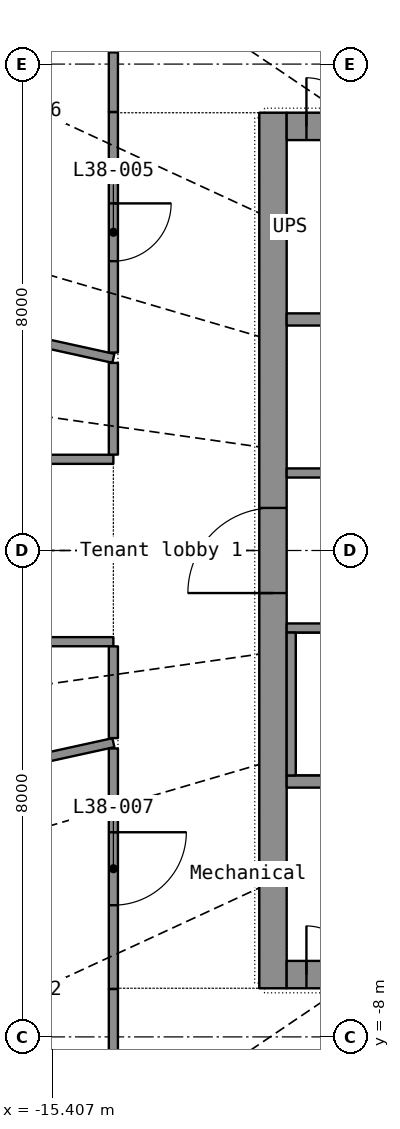
"""IFC4 building model, lengths in metres.
Left out: names, types, materials, properties, quantities, classifications, styles, units other than length and angle.
Written with IfcOpenShell. Run it as: python <this file> out.ifc"""

import sys

from ifc_helpers import new_model, si_unit, direction, frame, frame_2d, origin, place, context, subcontext, project, spatial, rectangle, extrude, element, fill, save


model = new_model("IFC4")
c1 = context("Model", 3, precision=1e-05, world=origin(), true_north=direction((0.0, 1.0)))
c2 = subcontext(c1, "Body", "Model", "MODEL_VIEW")
j1 = project(units=[si_unit("LENGTHUNIT", "METRE"), si_unit("PLANEANGLEUNIT", "RADIAN")], contexts=[c1])
p1 = place(None, origin())
s1 = spatial("IfcSite", under=j1, at=p1, CompositionType="ELEMENT")
p2 = place(p1, origin())
s2 = spatial("IfcBuilding", under=s1, at=p2, CompositionType="ELEMENT")
p3 = place(p2, frame((0.0, 0.0, 160.8)))
s3 = spatial("IfcBuildingStorey", under=s2, at=p3, CompositionType="ELEMENT", Elevation=160.8)
p4 = place(p3, frame((-11.775, -7.2, 0.0), z_axis=(0.0, 0.0, 1.0), x_axis=(0.0, 1.0, 0.0)))
e1 = element("IfcWall", 1, at=p4, inside=s3, PredefinedType="SHEAR", context=c2, shape_type="SweptSolid", body=[
    extrude(rectangle(XDim=14.4, YDim=0.45, at=frame_2d((7.2, 0.0))), origin(), (0.0, 0.0, 1.0), 3.3),
])
p5 = place(p4, frame((6.5, 0.0, 0.0)))
e2 = element("IfcOpeningElement", 2, at=p5, cuts=e1, PredefinedType="OPENING", context=c2, shape_type="SweptSolid", body=[
    extrude(rectangle(XDim=1.4, YDim=2.2, at=frame_2d((0.7, 1.1))), frame((0.0, 0.235, 0.0), z_axis=(0.0, -1.0, 0.0), x_axis=(1.0, 0.0, 0.0)), (0.0, 0.0, 1.0), 0.47),
])
p6 = place(p3, frame((-11.55, -6.975, 0.0), z_axis=(0.0, 0.0, 1.0), x_axis=(1.0, 0.0, 0.0)))
e3 = element("IfcWall", 3, at=p6, inside=s3, PredefinedType="SHEAR", context=c2, shape_type="SweptSolid", body=[
    extrude(rectangle(XDim=23.1, YDim=0.45, at=frame_2d((11.55, 0.0))), origin(), (0.0, 0.0, 1.0), 3.3),
])
p7 = place(p6, frame((20.0, 0.0, 0.0)))
e4 = element("IfcOpeningElement", 4, at=p7, cuts=e3, PredefinedType="OPENING", context=c2, shape_type="SweptSolid", body=[
    extrude(rectangle(XDim=1.1, YDim=2.2, at=frame_2d((0.55, 1.1))), frame((0.0, 0.235, 0.0), z_axis=(0.0, -1.0, 0.0), x_axis=(1.0, 0.0, 0.0)), (0.0, 0.0, 1.0), 0.47),
])
p8 = place(p6, frame((3.1, 0.0, 0.0)))
e5 = element("IfcOpeningElement", 5, at=p8, cuts=e3, PredefinedType="OPENING", context=c2, shape_type="SweptSolid", body=[
    extrude(rectangle(XDim=0.9, YDim=2.1, at=frame_2d((0.45, 1.05))), frame((0.0, 0.235, 0.0), z_axis=(0.0, -1.0, 0.0), x_axis=(1.0, 0.0, 0.0)), (0.0, 0.0, 1.0), 0.47),
])
p9 = place(p6, frame((9.1, 0.0, 0.0)))
e6 = element("IfcOpeningElement", 6, at=p9, cuts=e3, PredefinedType="OPENING", context=c2, shape_type="SweptSolid", body=[
    extrude(rectangle(XDim=0.9, YDim=2.1, at=frame_2d((0.45, 1.05))), frame((0.0, 0.235, 0.0), z_axis=(0.0, -1.0, 0.0), x_axis=(1.0, 0.0, 0.0)), (0.0, 0.0, 1.0), 0.47),
])
p10 = place(p6, frame((16.1, 0.0, 0.0)))
e7 = element("IfcOpeningElement", 7, at=p10, cuts=e3, PredefinedType="OPENING", context=c2, shape_type="SweptSolid", body=[
    extrude(rectangle(XDim=0.9, YDim=2.1, at=frame_2d((0.45, 1.05))), frame((0.0, 0.235, 0.0), z_axis=(0.0, -1.0, 0.0), x_axis=(1.0, 0.0, 0.0)), (0.0, 0.0, 1.0), 0.47),
])
p11 = place(p6, frame((0.325, 0.0, 0.0)))
e8 = element("IfcOpeningElement", 8, at=p11, cuts=e3, PredefinedType="OPENING", context=c2, shape_type="SweptSolid", body=[
    extrude(rectangle(XDim=0.8, YDim=2.05, at=frame_2d((0.4, 1.025))), frame((0.0, 0.235, 0.0), z_axis=(0.0, -1.0, 0.0), x_axis=(1.0, 0.0, 0.0)), (0.0, 0.0, 1.0), 0.47),
])
p12 = place(p6, frame((21.975, 0.0, 0.0)))
e9 = element("IfcOpeningElement", 9, at=p12, cuts=e3, PredefinedType="OPENING", context=c2, shape_type="SweptSolid", body=[
    extrude(rectangle(XDim=0.8, YDim=2.05, at=frame_2d((0.4, 1.025))), frame((0.0, 0.235, 0.0), z_axis=(0.0, -1.0, 0.0), x_axis=(1.0, 0.0, 0.0)), (0.0, 0.0, 1.0), 0.47),
])
p13 = place(p3, frame((-11.55, 6.975, 0.0), z_axis=(0.0, 0.0, 1.0), x_axis=(1.0, 0.0, 0.0)))
e10 = element("IfcWall", 10, at=p13, inside=s3, PredefinedType="SHEAR", context=c2, shape_type="SweptSolid", body=[
    extrude(rectangle(XDim=23.1, YDim=0.45, at=frame_2d((11.55, 0.0))), origin(), (0.0, 0.0, 1.0), 3.3),
])
p14 = place(p13, frame((2.0, 0.0, 0.0)))
e11 = element("IfcOpeningElement", 11, at=p14, cuts=e10, PredefinedType="OPENING", context=c2, shape_type="SweptSolid", body=[
    extrude(rectangle(XDim=1.1, YDim=2.2, at=frame_2d((0.55, 1.1))), frame((0.0, 0.235, 0.0), z_axis=(0.0, -1.0, 0.0), x_axis=(1.0, 0.0, 0.0)), (0.0, 0.0, 1.0), 0.47),
])
p15 = place(p13, frame((6.0, 0.0, 0.0)))
e12 = element("IfcOpeningElement", 12, at=p15, cuts=e10, PredefinedType="OPENING", context=c2, shape_type="SweptSolid", body=[
    extrude(rectangle(XDim=1.1, YDim=2.2, at=frame_2d((0.55, 1.1))), frame((0.0, 0.235, 0.0), z_axis=(0.0, -1.0, 0.0), x_axis=(1.0, 0.0, 0.0)), (0.0, 0.0, 1.0), 0.47),
])
p16 = place(p13, frame((8.0, 0.0, 0.0)))
e13 = element("IfcOpeningElement", 13, at=p16, cuts=e10, PredefinedType="OPENING", context=c2, shape_type="SweptSolid", body=[
    extrude(rectangle(XDim=1.1, YDim=2.2, at=frame_2d((0.55, 1.1))), frame((0.0, 0.235, 0.0), z_axis=(0.0, -1.0, 0.0), x_axis=(1.0, 0.0, 0.0)), (0.0, 0.0, 1.0), 0.47),
])
p17 = place(p13, frame((10.0, 0.0, 0.0)))
e14 = element("IfcOpeningElement", 14, at=p17, cuts=e10, PredefinedType="OPENING", context=c2, shape_type="SweptSolid", body=[
    extrude(rectangle(XDim=1.1, YDim=2.2, at=frame_2d((0.55, 1.1))), frame((0.0, 0.235, 0.0), z_axis=(0.0, -1.0, 0.0), x_axis=(1.0, 0.0, 0.0)), (0.0, 0.0, 1.0), 0.47),
])
p18 = place(p13, frame((12.0, 0.0, 0.0)))
e15 = element("IfcOpeningElement", 15, at=p18, cuts=e10, PredefinedType="OPENING", context=c2, shape_type="SweptSolid", body=[
    extrude(rectangle(XDim=1.1, YDim=2.2, at=frame_2d((0.55, 1.1))), frame((0.0, 0.235, 0.0), z_axis=(0.0, -1.0, 0.0), x_axis=(1.0, 0.0, 0.0)), (0.0, 0.0, 1.0), 0.47),
])
p19 = place(p13, frame((14.0, 0.0, 0.0)))
e16 = element("IfcOpeningElement", 16, at=p19, cuts=e10, PredefinedType="OPENING", context=c2, shape_type="SweptSolid", body=[
    extrude(rectangle(XDim=1.1, YDim=2.2, at=frame_2d((0.55, 1.1))), frame((0.0, 0.235, 0.0), z_axis=(0.0, -1.0, 0.0), x_axis=(1.0, 0.0, 0.0)), (0.0, 0.0, 1.0), 0.47),
])
p20 = place(p13, frame((16.0, 0.0, 0.0)))
e17 = element("IfcOpeningElement", 17, at=p20, cuts=e10, PredefinedType="OPENING", context=c2, shape_type="SweptSolid", body=[
    extrude(rectangle(XDim=1.1, YDim=2.2, at=frame_2d((0.55, 1.1))), frame((0.0, 0.235, 0.0), z_axis=(0.0, -1.0, 0.0), x_axis=(1.0, 0.0, 0.0)), (0.0, 0.0, 1.0), 0.47),
])
p21 = place(p13, frame((18.0, 0.0, 0.0)))
e18 = element("IfcOpeningElement", 18, at=p21, cuts=e10, PredefinedType="OPENING", context=c2, shape_type="SweptSolid", body=[
    extrude(rectangle(XDim=1.1, YDim=2.2, at=frame_2d((0.55, 1.1))), frame((0.0, 0.235, 0.0), z_axis=(0.0, -1.0, 0.0), x_axis=(1.0, 0.0, 0.0)), (0.0, 0.0, 1.0), 0.47),
])
p22 = place(p13, frame((20.0, 0.0, 0.0)))
e19 = element("IfcOpeningElement", 19, at=p22, cuts=e10, PredefinedType="OPENING", context=c2, shape_type="SweptSolid", body=[
    extrude(rectangle(XDim=1.1, YDim=2.2, at=frame_2d((0.55, 1.1))), frame((0.0, 0.235, 0.0), z_axis=(0.0, -1.0, 0.0), x_axis=(1.0, 0.0, 0.0)), (0.0, 0.0, 1.0), 0.47),
])
p23 = place(p13, frame((4.1, 0.0, 0.0)))
e20 = element("IfcOpeningElement", 20, at=p23, cuts=e10, PredefinedType="OPENING", context=c2, shape_type="SweptSolid", body=[
    extrude(rectangle(XDim=0.9, YDim=2.1, at=frame_2d((0.45, 1.05))), frame((0.0, 0.235, 0.0), z_axis=(0.0, -1.0, 0.0), x_axis=(1.0, 0.0, 0.0)), (0.0, 0.0, 1.0), 0.47),
])
p24 = place(p13, frame((0.325, 0.0, 0.0)))
e21 = element("IfcOpeningElement", 21, at=p24, cuts=e10, PredefinedType="OPENING", context=c2, shape_type="SweptSolid", body=[
    extrude(rectangle(XDim=0.8, YDim=2.05, at=frame_2d((0.4, 1.025))), frame((0.0, 0.235, 0.0), z_axis=(0.0, -1.0, 0.0), x_axis=(1.0, 0.0, 0.0)), (0.0, 0.0, 1.0), 0.47),
])
p25 = place(p13, frame((21.975, 0.0, 0.0)))
e22 = element("IfcOpeningElement", 22, at=p25, cuts=e10, PredefinedType="OPENING", context=c2, shape_type="SweptSolid", body=[
    extrude(rectangle(XDim=0.8, YDim=2.05, at=frame_2d((0.4, 1.025))), frame((0.0, 0.235, 0.0), z_axis=(0.0, -1.0, 0.0), x_axis=(1.0, 0.0, 0.0)), (0.0, 0.0, 1.0), 0.47),
])
for number, where, z_axis, x_axis in (
    (23, (-11.55, -3.8, 0.0), (0.0, 0.0, 1.0), (1.0, 0.0, 0.0)),
    (24, (-11.55, 3.8, 0.0), (0.0, 0.0, 1.0), (1.0, 0.0, 0.0)),
):
    element("IfcWall", number, at=place(p3, frame(where, z_axis=z_axis, x_axis=x_axis)), inside=s3, PredefinedType="SHEAR", context=c2, shape_type="SweptSolid", body=[
        extrude(rectangle(XDim=23.1, YDim=0.2, at=frame_2d((11.55, 0.0))), origin(), (0.0, 0.0, 1.0), 3.3),
    ])
p26 = place(p3, frame((-11.55, -1.275, 0.0), z_axis=(0.0, 0.0, 1.0), x_axis=(1.0, 0.0, 0.0)))
e25 = element("IfcWall", 25, at=p26, inside=s3, PredefinedType="SHEAR", context=c2, shape_type="SweptSolid", body=[
    extrude(rectangle(XDim=8.55, YDim=0.15, at=frame_2d((4.275, 0.0))), origin(), (0.0, 0.0, 1.0), 3.3),
])
p27 = place(p26, frame((5.4, 0.0, 0.0)))
e26 = element("IfcOpeningElement", 26, at=p27, cuts=e25, PredefinedType="OPENING", context=c2, shape_type="SweptSolid", body=[
    extrude(rectangle(XDim=1.1, YDim=2.15, at=frame_2d((0.55, 1.075))), frame((0.0, 0.085, 0.0), z_axis=(0.0, -1.0, 0.0), x_axis=(1.0, 0.0, 0.0)), (0.0, 0.0, 1.0), 0.17),
])
p28 = place(p26, frame((7.2, 0.0, 0.0)))
e27 = element("IfcOpeningElement", 27, at=p28, cuts=e25, PredefinedType="OPENING", context=c2, shape_type="SweptSolid", body=[
    extrude(rectangle(XDim=0.9, YDim=2.1, at=frame_2d((0.45, 1.05))), frame((0.0, 0.085, 0.0), z_axis=(0.0, -1.0, 0.0), x_axis=(1.0, 0.0, 0.0)), (0.0, 0.0, 1.0), 0.17),
])
p29 = place(p3, frame((-11.55, 1.275, 0.0), z_axis=(0.0, 0.0, 1.0), x_axis=(1.0, 0.0, 0.0)))
e28 = element("IfcWall", 28, at=p29, inside=s3, PredefinedType="PARTITIONING", context=c2, shape_type="SweptSolid", body=[
    extrude(rectangle(XDim=8.55, YDim=0.15, at=frame_2d((4.275, 0.0))), origin(), (0.0, 0.0, 1.0), 3.3),
])
p30 = place(p29, frame((1.308, 0.0, 0.0)))
e29 = element("IfcOpeningElement", 29, at=p30, cuts=e28, PredefinedType="OPENING", context=c2, shape_type="SweptSolid", body=[
    extrude(rectangle(XDim=0.85, YDim=2.1, at=frame_2d((0.425, 1.05))), frame((0.0, 0.085, 0.0), z_axis=(0.0, -1.0, 0.0), x_axis=(1.0, 0.0, 0.0)), (0.0, 0.0, 1.0), 0.17),
])
p31 = place(p29, frame((4.427, 0.0, 0.0)))
e30 = element("IfcOpeningElement", 30, at=p31, cuts=e28, PredefinedType="OPENING", context=c2, shape_type="SweptSolid", body=[
    extrude(rectangle(XDim=0.85, YDim=2.1, at=frame_2d((0.425, 1.05))), frame((0.0, 0.085, 0.0), z_axis=(0.0, -1.0, 0.0), x_axis=(1.0, 0.0, 0.0)), (0.0, 0.0, 1.0), 0.17),
])
p32 = place(p29, frame((6.945, 0.0, 0.0)))
e31 = element("IfcOpeningElement", 31, at=p32, cuts=e28, PredefinedType="OPENING", context=c2, shape_type="SweptSolid", body=[
    extrude(rectangle(XDim=0.9, YDim=2.1, at=frame_2d((0.45, 1.05))), frame((0.0, 0.085, 0.0), z_axis=(0.0, -1.0, 0.0), x_axis=(1.0, 0.0, 0.0)), (0.0, 0.0, 1.0), 0.17),
])
p33 = place(p3, frame((-11.475, -3.7, 0.0), z_axis=(0.0, 0.0, 1.0), x_axis=(0.0, 1.0, 0.0)))
e32 = element("IfcWall", 32, at=p33, inside=s3, PredefinedType="SHEAR", context=c2, shape_type="SweptSolid", body=[
    extrude(rectangle(XDim=2.35, YDim=0.15, at=frame_2d((1.175, 0.0))), origin(), (0.0, 0.0, 1.0), 3.3),
])
p34 = place(p3, frame((-22.981, 5.044, 0.0), z_axis=(0.0, 0.0, 1.0), x_axis=(0.976745479, -0.214402122, 0.0)))
e33 = element("IfcWall", 33, at=p34, inside=s3, PredefinedType="PARTITIONING", context=c2, shape_type="SweptSolid", body=[
    extrude(rectangle(XDim=8.785, YDim=0.15, at=frame_2d((4.393, 0.0))), origin(), (0.0, 0.0, 1.0), 2.4),
])
p35 = place(p3, frame((-22.979, -5.044, 0.0), z_axis=(0.0, 0.0, 1.0), x_axis=(0.976744911, 0.214404708, 0.0)))
e34 = element("IfcWall", 34, at=p35, inside=s3, PredefinedType="PARTITIONING", context=c2, shape_type="SweptSolid", body=[
    extrude(rectangle(XDim=8.784, YDim=0.15, at=frame_2d((4.392, 0.0))), origin(), (0.0, 0.0, 1.0), 2.4),
])
p36 = place(p3, frame((-21.202, -1.5, 0.0), z_axis=(0.0, 0.0, 1.0), x_axis=(1.0, 0.0, 0.0)))
e35 = element("IfcWall", 35, at=p36, inside=s3, PredefinedType="PARTITIONING", context=c2, shape_type="SweptSolid", body=[
    extrude(rectangle(XDim=6.802, YDim=0.15, at=frame_2d((3.401, 0.0))), origin(), (0.0, 0.0, 1.0), 2.4),
])
p37 = place(p36, frame((2.801, 0.0, 0.0)))
e36 = element("IfcOpeningElement", 36, at=p37, cuts=e35, PredefinedType="OPENING", context=c2, shape_type="SweptSolid", body=[
    extrude(rectangle(XDim=1.2, YDim=2.2, at=frame_2d((0.6, 1.1))), frame((0.0, 0.085, 0.0), z_axis=(0.0, -1.0, 0.0), x_axis=(1.0, 0.0, 0.0)), (0.0, 0.0, 1.0), 0.17),
])
p38 = place(p3, frame((-14.4, 1.5, 0.0), z_axis=(0.0, 0.0, 1.0), x_axis=(-1.0, 0.0, 0.0)))
e37 = element("IfcWall", 37, at=p38, inside=s3, PredefinedType="PARTITIONING", context=c2, shape_type="SweptSolid", body=[
    extrude(rectangle(XDim=6.802, YDim=0.15, at=frame_2d((3.401, 0.0))), origin(), (0.0, 0.0, 1.0), 2.4),
])
p39 = place(p3, frame((-19.483, 11.175, 0.0), z_axis=(0.0, 0.0, 1.0), x_axis=(0.867447243, -0.497529176, 0.0)))
e38 = element("IfcWall", 38, at=p39, inside=s3, PredefinedType="PARTITIONING", context=c2, shape_type="SweptSolid", body=[
    extrude(rectangle(XDim=5.86, YDim=0.15, at=frame_2d((2.93, 0.0))), origin(), (0.0, 0.0, 1.0), 2.4),
])
p40 = place(p3, frame((-14.4, -3.256, 0.0), z_axis=(0.0, 0.0, 1.0), x_axis=(0.0, -1.0, 0.0)))
e39 = element("IfcWall", 39, at=p40, inside=s3, PredefinedType="PARTITIONING", context=c2, shape_type="SweptSolid", body=[
    extrude(rectangle(XDim=3.956, YDim=0.15, at=frame_2d((1.978, 0.0))), origin(), (0.0, 0.0, 1.0), 2.4),
])
p41 = place(p40, frame((1.378, 0.0, 0.0)))
e40 = element("IfcOpeningElement", 40, at=p41, cuts=e39, PredefinedType="OPENING", context=c2, shape_type="SweptSolid", body=[
    extrude(rectangle(XDim=1.2, YDim=2.2, at=frame_2d((0.6, 1.1))), frame((0.0, 0.085, 0.0), z_axis=(0.0, -1.0, 0.0), x_axis=(1.0, 0.0, 0.0)), (0.0, 0.0, 1.0), 0.17),
])
p42 = place(p3, frame((-14.4, 7.212, 0.0), z_axis=(0.0, 0.0, 1.0), x_axis=(0.0, -1.0, 0.0)))
e41 = element("IfcWall", 41, at=p42, inside=s3, PredefinedType="PARTITIONING", context=c2, shape_type="SweptSolid", body=[
    extrude(rectangle(XDim=3.956, YDim=0.15, at=frame_2d((1.978, 0.0))), origin(), (0.0, 0.0, 1.0), 2.4),
])
p43 = place(p42, frame((1.503, 0.0, 0.0)))
e42 = element("IfcOpeningElement", 42, at=p43, cuts=e41, PredefinedType="OPENING", context=c2, shape_type="SweptSolid", body=[
    extrude(rectangle(XDim=0.95, YDim=2.15, at=frame_2d((0.475, 1.075))), frame((0.0, 0.085, 0.0), z_axis=(0.0, -1.0, 0.0), x_axis=(1.0, 0.0, 0.0)), (0.0, 0.0, 1.0), 0.17),
])
p44 = place(p3, frame((-14.4, -7.213, 0.0), z_axis=(0.0, 0.0, 1.0), x_axis=(0.0, -1.0, 0.0)))
e43 = element("IfcWall", 43, at=p44, inside=s3, PredefinedType="PARTITIONING", context=c2, shape_type="SweptSolid", body=[
    extrude(rectangle(XDim=2.31, YDim=0.15, at=frame_2d((1.155, 0.0))), origin(), (0.0, 0.0, 1.0), 2.4),
])
for number, where, z_axis, x_axis in (
    (44, (-14.4, -1.577, 0.0), (0.0, 0.0, 1.0), (0.0, -1.0, 0.0)),
    (45, (-14.4, 3.085, 0.0), (0.0, 0.0, 1.0), (0.0, -1.0, 0.0)),
):
    element("IfcWall", number, at=place(p3, frame(where, z_axis=z_axis, x_axis=x_axis)), inside=s3, PredefinedType="PARTITIONING", context=c2, shape_type="SweptSolid", body=[
        extrude(rectangle(XDim=1.508, YDim=0.15, at=frame_2d((0.754, 0.0))), origin(), (0.0, 0.0, 1.0), 2.4),
    ])
p45 = place(p3, frame((-14.4, 8.192, 0.0), z_axis=(0.0, 0.0, 1.0), x_axis=(0.0, -1.0, 0.0)))
e46 = element("IfcWall", 46, at=p45, inside=s3, PredefinedType="PARTITIONING", context=c2, shape_type="SweptSolid", body=[
    extrude(rectangle(XDim=0.979, YDim=0.15, at=frame_2d((0.49, 0.0))), origin(), (0.0, 0.0, 1.0), 2.4),
])
p46 = place(p11, origin())
e47 = element("IfcDoor", 47, at=p46, inside=s3, OperationType="SINGLE_SWING_LEFT", PredefinedType="DOOR", context=c2, shape_type="SweptSolid", body=[
    extrude(rectangle(XDim=0.8, YDim=2.05, at=frame_2d((0.4, 1.025))), frame((0.0, 0.025, 0.0), z_axis=(0.0, -1.0, 0.0), x_axis=(1.0, 0.0, 0.0)), (0.0, 0.0, 1.0), 0.05),
])
fill(e8, e47)
p47 = place(p24, origin())
e48 = element("IfcDoor", 48, at=p47, inside=s3, OperationType="SINGLE_SWING_LEFT", PredefinedType="DOOR", context=c2, shape_type="SweptSolid", body=[
    extrude(rectangle(XDim=0.8, YDim=2.05, at=frame_2d((0.4, 1.025))), frame((0.0, 0.025, 0.0), z_axis=(0.0, -1.0, 0.0), x_axis=(1.0, 0.0, 0.0)), (0.0, 0.0, 1.0), 0.05),
])
fill(e21, e48)
p48 = place(p5, origin())
e49 = element("IfcDoor", 49, at=p48, inside=s3, OperationType="DOUBLE_DOOR_SINGLE_SWING", PredefinedType="DOOR", context=c2, shape_type="SweptSolid", body=[
    extrude(rectangle(XDim=1.4, YDim=2.2, at=frame_2d((0.7, 1.1))), frame((0.0, 0.025, 0.0), z_axis=(0.0, -1.0, 0.0), x_axis=(1.0, 0.0, 0.0)), (0.0, 0.0, 1.0), 0.05),
])
fill(e2, e49)
p49 = place(p43, origin())
e50 = element("IfcDoor", 50, at=p49, inside=s3, OperationType="SINGLE_SWING_LEFT", PredefinedType="DOOR", context=c2, shape_type="SweptSolid", body=[
    extrude(rectangle(XDim=0.95, YDim=2.15, at=frame_2d((0.475, 1.075))), frame((0.0, 0.025, 0.0), z_axis=(0.0, -1.0, 0.0), x_axis=(1.0, 0.0, 0.0)), (0.0, 0.0, 1.0), 0.05),
])
fill(e42, e50)
p50 = place(p41, origin())
e51 = element("IfcDoor", 51, at=p50, inside=s3, OperationType="DOUBLE_DOOR_SINGLE_SWING", PredefinedType="DOOR", context=c2, shape_type="SweptSolid", body=[
    extrude(rectangle(XDim=1.2, YDim=2.2, at=frame_2d((0.6, 1.1))), frame((0.0, 0.025, 0.0), z_axis=(0.0, -1.0, 0.0), x_axis=(1.0, 0.0, 0.0)), (0.0, 0.0, 1.0), 0.05),
])
fill(e40, e51)
save(model, sys.argv[1])
